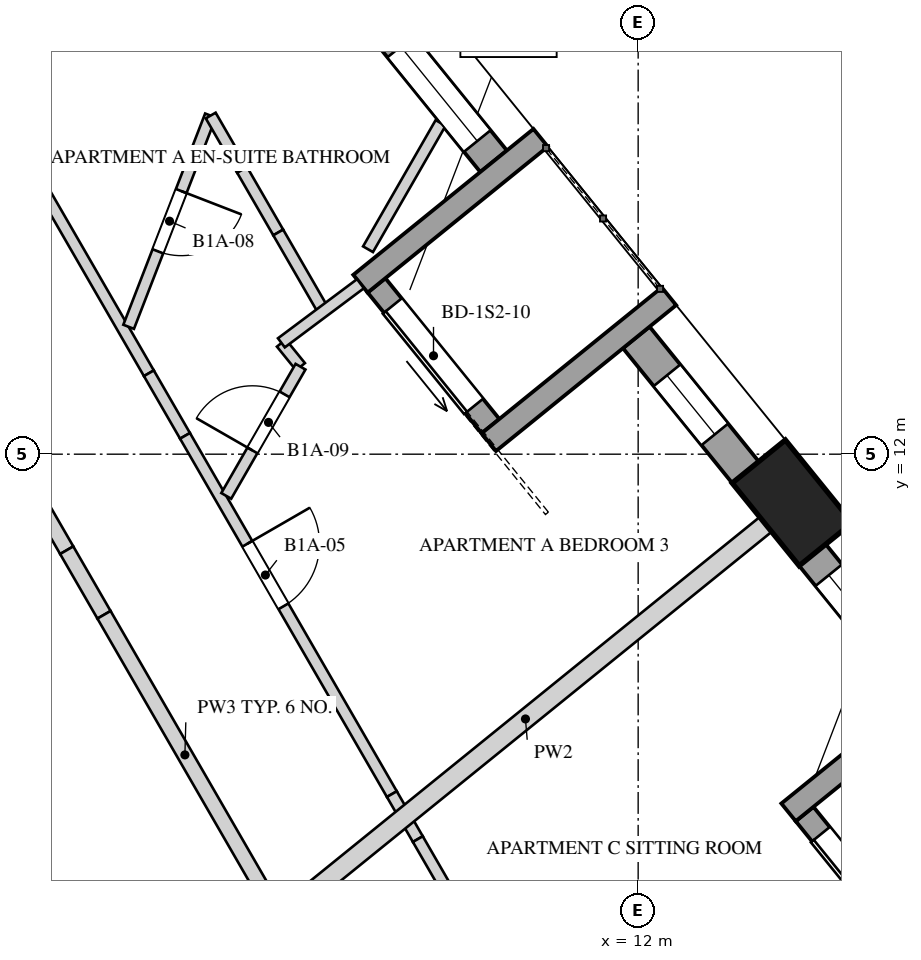
"""IFC4 building model, lengths in metres.
Left out: names, types, materials, properties, quantities, classifications, styles, units other than length and angle.
Written with IfcOpenShell. Run it as: python <this file> out.ifc"""

import sys

from ifc_helpers import new_model, si_unit, direction, frame, frame_2d, origin, origin_2d, place, context, subcontext, project, spatial, rectangle, extrude, element, fill, save


model = new_model("IFC4")
c1 = context("Model", 3, precision=1e-05, world=origin(), true_north=direction((0.0, 1.0)))
c2 = subcontext(c1, "Body", "Model", "MODEL_VIEW")
j1 = project(units=[si_unit("LENGTHUNIT", "METRE"), si_unit("PLANEANGLEUNIT", "RADIAN")], contexts=[c1])
p1 = place(None, origin())
s1 = spatial("IfcSite", under=j1, at=p1, CompositionType="ELEMENT")
p2 = place(p1, origin())
s2 = spatial("IfcBuilding", under=s1, at=p2, CompositionType="ELEMENT")
p3 = place(p2, frame((0.0, 0.0, 51.2)))
s3 = spatial("IfcBuildingStorey", under=s2, at=p3, CompositionType="ELEMENT", Elevation=51.2)
p4 = place(p3, frame((9.642, -4.25, 0.0), z_axis=(0.0, 0.0, 1.0), x_axis=(-0.499985955615, 0.866033512162, 0.0)))
e1 = element("IfcWall", 1, at=p4, inside=s3, PredefinedType="SHEAR", context=c2, shape_type="SweptSolid", body=[
    extrude(rectangle(XDim=17.003, YDim=1.05, at=frame_2d((8.501, 0.0))), origin(), (0.0, 0.0, 1.0), 4.0),
])
p5 = place(p4, frame((6.776, 0.0, 0.0)))
e2 = element("IfcOpeningElement", 2, at=p5, cuts=e1, PredefinedType="OPENING", context=c2, shape_type="SweptSolid", body=[
    extrude(rectangle(XDim=1.0, YDim=2.4, at=frame_2d((0.5, 1.2))), frame((0.0, 0.535, 0.0), z_axis=(0.0, -1.0, 0.0), x_axis=(1.0, 0.0, 0.0)), (0.0, 0.0, 1.0), 1.07),
])
p6 = place(p3, frame((14.028, 11.359, -0.35), z_axis=(0.0, 0.0, 1.0), x_axis=(-0.62932039105, 0.777145961457, 0.0)))
e3 = element("IfcColumn", 3, at=p6, inside=s3, PredefinedType="COLUMN", context=c2, shape_type="SweptSolid", body=[
    extrude(rectangle(XDim=1.4, YDim=0.9, at=origin_2d()), origin(), (0.0, 0.0, 1.0), 4.35),
])
p7 = place(p3, frame((15.73, 8.899, 0.0), z_axis=(0.0, 0.0, 1.0), x_axis=(-0.629339730135, 0.777130300576, 0.0)))
e4 = element("IfcWall", 4, at=p7, inside=s3, PredefinedType="SOLIDWALL", context=c2, shape_type="SweptSolid", body=[
    extrude(rectangle(XDim=2.283, YDim=0.45, at=frame_2d((1.142, 0.0))), origin(), (0.0, 0.0, 1.0), 3.3),
])
p8 = place(p7, frame((0.342, 0.0, 0.7)))
e5 = element("IfcOpeningElement", 5, at=p8, cuts=e4, PredefinedType="OPENING", context=c2, shape_type="SweptSolid", body=[
    extrude(rectangle(XDim=1.6, YDim=2.3, at=frame_2d((0.8, 1.15))), frame((0.0, 0.235, 0.0), z_axis=(0.0, -1.0, 0.0), x_axis=(1.0, 0.0, 0.0)), (0.0, 0.0, 1.0), 0.47),
])
p9 = place(p3, frame((13.412, 11.762, 0.0), z_axis=(0.0, 0.0, 1.0), x_axis=(-0.629339730135, 0.777130300576, 0.0)))
e6 = element("IfcWall", 6, at=p9, inside=s3, PredefinedType="SOLIDWALL", context=c2, shape_type="SweptSolid", body=[
    extrude(rectangle(XDim=2.283, YDim=0.45, at=frame_2d((1.142, 0.0))), origin(), (0.0, 0.0, 1.0), 3.3),
])
p10 = place(p9, frame((0.642, 0.0, 0.7)))
e7 = element("IfcOpeningElement", 7, at=p10, cuts=e6, PredefinedType="OPENING", context=c2, shape_type="SweptSolid", body=[
    extrude(rectangle(XDim=1.0, YDim=2.3, at=frame_2d((0.5, 1.15))), frame((0.0, 0.235, 0.0), z_axis=(0.0, -1.0, 0.0), x_axis=(1.0, 0.0, 0.0)), (0.0, 0.0, 1.0), 0.47),
])
p11 = place(p3, frame((10.098, 15.854, 0.0), z_axis=(0.0, 0.0, 1.0), x_axis=(-0.629339730135, 0.777130300576, 0.0)))
e8 = element("IfcWall", 8, at=p11, inside=s3, PredefinedType="SOLIDWALL", context=c2, shape_type="SweptSolid", body=[
    extrude(rectangle(XDim=2.283, YDim=0.45, at=frame_2d((1.142, 0.0))), origin(), (0.0, 0.0, 1.0), 3.3),
])
p12 = place(p11, frame((0.342, 0.0, 0.7)))
e9 = element("IfcOpeningElement", 9, at=p12, cuts=e8, PredefinedType="OPENING", context=c2, shape_type="SweptSolid", body=[
    extrude(rectangle(XDim=1.6, YDim=2.3, at=frame_2d((0.8, 1.15))), frame((0.0, 0.235, 0.0), z_axis=(0.0, -1.0, 0.0), x_axis=(1.0, 0.0, 0.0)), (0.0, 0.0, 1.0), 0.47),
])
p13 = place(p3, frame((15.689, 5.414, 0.0), z_axis=(0.0, 0.0, 1.0), x_axis=(-0.629319049918, 0.777147047482, 0.0)))
e10 = element("IfcWall", 10, at=p13, inside=s3, PredefinedType="SOLIDWALL", context=c2, shape_type="SweptSolid", body=[
    extrude(rectangle(XDim=2.383, YDim=0.3, at=frame_2d((1.191, 0.0))), origin(), (0.0, 0.0, 1.0), 3.3),
])
p14 = place(p13, frame((0.342, 0.0, 0.0)))
e11 = element("IfcOpeningElement", 11, at=p14, cuts=e10, PredefinedType="OPENING", context=c2, shape_type="SweptSolid", body=[
    extrude(rectangle(XDim=1.7, YDim=2.4, at=frame_2d((0.85, 1.2))), frame((0.0, 0.16, 0.0), z_axis=(0.0, -1.0, 0.0), x_axis=(1.0, 0.0, 0.0)), (0.0, 0.0, 1.0), 0.32),
])
p15 = place(p3, frame((16.349, 9.208, 0.0), z_axis=(0.0, 0.0, 1.0), x_axis=(-0.777153523895, -0.629311052102, 0.0)))
e12 = element("IfcWall", 12, at=p15, inside=s3, PredefinedType="SOLIDWALL", context=c2, shape_type="SweptSolid", body=[
    extrude(rectangle(XDim=3.05, YDim=0.3, at=frame_2d((1.525, 0.0))), origin(), (0.0, 0.0, 1.0), 3.3),
])
p16 = place(p3, frame((10.057, 12.369, 0.0), z_axis=(0.0, 0.0, 1.0), x_axis=(-0.629257171563, 0.777197151331, 0.0)))
e13 = element("IfcWall", 13, at=p16, inside=s3, PredefinedType="SOLIDWALL", context=c2, shape_type="SweptSolid", body=[
    extrude(rectangle(XDim=2.383, YDim=0.3, at=frame_2d((1.191, 0.0))), origin(), (0.0, 0.0, 1.0), 3.3),
])
p17 = place(p16, frame((0.342, 0.0, 0.0)))
e14 = element("IfcOpeningElement", 14, at=p17, cuts=e13, PredefinedType="OPENING", context=c2, shape_type="SweptSolid", body=[
    extrude(rectangle(XDim=1.7, YDim=2.4, at=frame_2d((0.85, 1.2))), frame((0.0, 0.16, 0.0), z_axis=(0.0, -1.0, 0.0), x_axis=(1.0, 0.0, 0.0)), (0.0, 0.0, 1.0), 0.32),
])
p18 = place(p3, frame((12.406, 14.077, 0.0), z_axis=(0.0, 0.0, 1.0), x_axis=(-0.777153523895, -0.629311052102, 0.0)))
e15 = element("IfcWall", 15, at=p18, inside=s3, PredefinedType="SOLIDWALL", context=c2, shape_type="SweptSolid", body=[
    extrude(rectangle(XDim=3.05, YDim=0.3, at=frame_2d((1.525, 0.0))), origin(), (0.0, 0.0, 1.0), 3.3),
])
p19 = place(p3, frame((10.717, 16.162, 0.0), z_axis=(0.0, 0.0, 1.0), x_axis=(-0.777121820661, -0.629350201281, 0.0)))
e16 = element("IfcWall", 16, at=p19, inside=s3, PredefinedType="SOLIDWALL", context=c2, shape_type="SweptSolid", body=[
    extrude(rectangle(XDim=3.05, YDim=0.3, at=frame_2d((1.525, 0.0))), origin(), (0.0, 0.0, 1.0), 3.3),
])
p20 = place(p3, frame((5.026, 2.244, 0.0), z_axis=(0.0, 0.0, 1.0), x_axis=(-0.500002801628, 0.866023786258, 0.0)))
e17 = element("IfcWall", 17, at=p20, inside=s3, PredefinedType="SOLIDWALL", context=c2, shape_type="SweptSolid", body=[
    extrude(rectangle(XDim=4.9, YDim=0.25, at=frame_2d((2.45, 0.0))), origin(), (0.0, 0.0, 1.0), 3.65),
])
p21 = place(p3, frame((4.099, 15.6, 0.0), z_axis=(0.0, 0.0, 1.0), x_axis=(0.500013600279, -0.866017551517, 0.0)))
e18 = element("IfcWall", 18, at=p21, inside=s3, PredefinedType="PARTITIONING", context=c2, shape_type="SweptSolid", body=[
    extrude(rectangle(XDim=2.928, YDim=0.15, at=frame_2d((1.464, 0.0))), origin(), (0.0, 0.0, 1.0), 3.65),
])
p22 = place(p3, frame((5.563, 13.065, 0.0), z_axis=(0.0, 0.0, 1.0), x_axis=(0.500033686847, -0.8660059538, 0.0)))
e19 = element("IfcWall", 19, at=p22, inside=s3, PredefinedType="PARTITIONING", context=c2, shape_type="SweptSolid", body=[
    extrude(rectangle(XDim=0.951, YDim=0.15, at=frame_2d((0.475, 0.0))), origin(), (0.0, 0.0, 1.0), 2.75),
])
p23 = place(p3, frame((6.038, 12.241, 0.0), z_axis=(0.0, 0.0, 1.0), x_axis=(0.500003308737, -0.866023493476, 0.0)))
e20 = element("IfcWall", 20, at=p23, inside=s3, PredefinedType="PARTITIONING", context=c2, shape_type="SweptSolid", body=[
    extrude(rectangle(XDim=5.443, YDim=0.15, at=frame_2d((2.721, 0.0))), origin(), (0.0, 0.0, 1.0), 3.65),
])
p24 = place(p23, frame((1.64, 0.0, 0.0)))
e21 = element("IfcOpeningElement", 21, at=p24, cuts=e20, PredefinedType="OPENING", context=c2, shape_type="SweptSolid", body=[
    extrude(rectangle(XDim=0.95, YDim=2.4, at=frame_2d((0.475, 1.2))), frame((0.0, 0.085, 0.0), z_axis=(0.0, -1.0, 0.0), x_axis=(1.0, 0.0, 0.0)), (0.0, 0.0, 1.0), 0.17),
])
p25 = place(p3, frame((8.76, 7.528, 0.0), z_axis=(0.0, 0.0, 1.0), x_axis=(0.499712146016, -0.866191532586, 0.0)))
e22 = element("IfcWall", 22, at=p25, inside=s3, PredefinedType="PARTITIONING", context=c2, shape_type="SweptSolid", body=[
    extrude(rectangle(XDim=0.684, YDim=0.15, at=frame_2d((0.342, 0.0))), origin(), (0.0, 0.0, 1.0), 2.95),
])
p26 = place(p3, frame((9.101, 6.936, 0.0), z_axis=(0.0, 0.0, 1.0), x_axis=(0.500008794324, -0.866020326319, 0.0)))
e23 = element("IfcWall", 23, at=p26, inside=s3, PredefinedType="PARTITIONING", context=c2, shape_type="SweptSolid", body=[
    extrude(rectangle(XDim=4.601, YDim=0.15, at=frame_2d((2.3, 0.0))), origin(), (0.0, 0.0, 1.0), 3.65),
])
p27 = place(p26, frame((1.922, 0.0, 0.0)))
e24 = element("IfcOpeningElement", 24, at=p27, cuts=e23, PredefinedType="OPENING", context=c2, shape_type="SweptSolid", body=[
    extrude(rectangle(XDim=0.95, YDim=2.4, at=frame_2d((0.475, 1.2))), frame((0.0, 0.085, 0.0), z_axis=(0.0, -1.0, 0.0), x_axis=(1.0, 0.0, 0.0)), (0.0, 0.0, 1.0), 0.17),
])
p28 = place(p3, frame((6.373, 16.455, 0.0), z_axis=(0.0, 0.0, 1.0), x_axis=(-0.361113609809, -0.932521828597, 0.0)))
e25 = element("IfcWall", 25, at=p28, inside=s3, PredefinedType="PARTITIONING", context=c2, shape_type="SweptSolid", body=[
    extrude(rectangle(XDim=2.98, YDim=0.15, at=frame_2d((1.49, 0.0))), origin(), (0.0, 0.0, 1.0), 3.65),
])
p29 = place(p28, frame((1.065, 0.0, 0.0)))
e26 = element("IfcOpeningElement", 26, at=p29, cuts=e25, PredefinedType="OPENING", context=c2, shape_type="SweptSolid", body=[
    extrude(rectangle(XDim=0.85, YDim=2.4, at=frame_2d((0.425, 1.2))), frame((0.0, 0.085, 0.0), z_axis=(0.0, -1.0, 0.0), x_axis=(1.0, 0.0, 0.0)), (0.0, 0.0, 1.0), 0.17),
])
p30 = place(p3, frame((6.376, 16.455, 0.0), z_axis=(0.0, 0.0, 1.0), x_axis=(0.500080620599, -0.865978852456, 0.0)))
e27 = element("IfcWall", 27, at=p30, inside=s3, PredefinedType="PARTITIONING", context=c2, shape_type="SweptSolid", body=[
    extrude(rectangle(XDim=0.826, YDim=0.15, at=frame_2d((0.413, 0.0))), origin(), (0.0, 0.0, 1.0), 3.65),
])
p31 = place(p3, frame((6.79, 15.74, 0.0), z_axis=(0.0, 0.0, 1.0), x_axis=(0.500144919923, -0.865941718059, 0.0)))
e28 = element("IfcWall", 28, at=p31, inside=s3, PredefinedType="PARTITIONING", context=c2, shape_type="SweptSolid", body=[
    extrude(rectangle(XDim=0.95, YDim=0.15, at=frame_2d((0.475, 0.0))), origin(), (0.0, 0.0, 1.0), 2.75),
])
p32 = place(p3, frame((7.265, 14.917, 0.0), z_axis=(0.0, 0.0, 1.0), x_axis=(0.49995746443, -0.866049960314, 0.0)))
e29 = element("IfcWall", 29, at=p32, inside=s3, PredefinedType="PARTITIONING", context=c2, shape_type="SweptSolid", body=[
    extrude(rectangle(XDim=1.169, YDim=0.15, at=frame_2d((0.584, 0.0))), origin(), (0.0, 0.0, 1.0), 3.65),
])
p33 = place(p3, frame((7.306, 13.462, 0.0), z_axis=(0.0, 0.0, 1.0), x_axis=(0.629373821477, -0.777102691309, 0.0)))
e30 = element("IfcWall", 30, at=p33, inside=s3, PredefinedType="PARTITIONING", context=c2, shape_type="SweptSolid", body=[
    extrude(rectangle(XDim=0.4, YDim=0.15, at=frame_2d((0.2, 0.0))), origin(), (0.0, 0.0, 1.0), 3.65),
])
p34 = place(p3, frame((6.581, 11.451, 0.0), z_axis=(0.0, 0.0, 1.0), x_axis=(0.498323693161, 0.866991059259, 0.0)))
e31 = element("IfcWall", 31, at=p34, inside=s3, PredefinedType="PARTITIONING", context=c2, shape_type="SweptSolid", body=[
    extrude(rectangle(XDim=1.96, YDim=0.15, at=frame_2d((0.98, 0.0))), origin(), (0.0, 0.0, 1.0), 3.65),
])
p35 = place(p34, frame((0.69, 0.0, 0.0)))
e32 = element("IfcOpeningElement", 32, at=p35, cuts=e31, PredefinedType="OPENING", context=c2, shape_type="SweptSolid", body=[
    extrude(rectangle(XDim=0.85, YDim=2.4, at=frame_2d((0.425, 1.2))), frame((0.0, 0.085, 0.0), z_axis=(0.0, -1.0, 0.0), x_axis=(1.0, 0.0, 0.0)), (0.0, 0.0, 1.0), 0.17),
])
p36 = place(p3, frame((8.347, 14.243, 0.0), z_axis=(0.0, 0.0, 1.0), x_axis=(-0.800856036298, -0.598856918742, 0.0)))
e33 = element("IfcWall", 33, at=p36, inside=s3, PredefinedType="PARTITIONING", context=c2, shape_type="SweptSolid", body=[
    extrude(rectangle(XDim=1.299, YDim=0.15, at=frame_2d((0.65, 0.0))), origin(), (0.0, 0.0, 1.0), 3.65),
])
p37 = place(p3, frame((9.401, 16.358, 0.0), z_axis=(0.0, 0.0, 1.0), x_axis=(-0.498291581793, -0.867009515239, 0.0)))
e34 = element("IfcWall", 34, at=p37, inside=s3, PredefinedType="PARTITIONING", context=c2, shape_type="SweptSolid", body=[
    extrude(rectangle(XDim=1.916, YDim=0.15, at=frame_2d((0.958, 0.0))), origin(), (0.0, 0.0, 1.0), 3.65),
])
p38 = place(p3, frame((13.678, 11.076, 0.0), z_axis=(0.0, 0.0, 1.0), x_axis=(-0.777150492193, -0.629314796015, 0.0)))
e35 = element("IfcWall", 35, at=p38, inside=s3, PredefinedType="SOLIDWALL", context=c2, shape_type="SweptSolid", body=[
    extrude(rectangle(XDim=8.133, YDim=0.25, at=frame_2d((4.067, 0.0))), origin(), (0.0, 0.0, 1.0), 2.95),
])
p39 = place(p3, frame((2.887, 13.5, 0.0), z_axis=(0.0, 0.0, 1.0), x_axis=(0.50003154259, -0.866007191896, 0.0)))
e36 = element("IfcWall", 36, at=p39, inside=s3, PredefinedType="SOLIDWALL", context=c2, shape_type="SweptSolid", body=[
    extrude(rectangle(XDim=3.191, YDim=0.2, at=frame_2d((1.595, 0.0))), origin(), (0.0, 0.0, 1.0), 3.65),
])
p40 = place(p3, frame((4.482, 10.737, 0.0), z_axis=(0.0, 0.0, 1.0), x_axis=(0.499966601515, -0.86604468555, 0.0)))
e37 = element("IfcWall", 37, at=p40, inside=s3, PredefinedType="SOLIDWALL", context=c2, shape_type="SweptSolid", body=[
    extrude(rectangle(XDim=0.981, YDim=0.2, at=frame_2d((0.49, 0.0))), origin(), (0.0, 0.0, 1.0), 2.75),
])
p41 = place(p3, frame((4.973, 9.887, 0.0), z_axis=(0.0, 0.0, 1.0), x_axis=(0.500000470374, -0.866025132214, 0.0)))
e38 = element("IfcWall", 38, at=p41, inside=s3, PredefinedType="SOLIDWALL", context=c2, shape_type="SweptSolid", body=[
    extrude(rectangle(XDim=4.257, YDim=0.2, at=frame_2d((2.128, 0.0))), origin(), (0.0, 0.0, 1.0), 3.65),
])
p42 = place(p8, origin())
e39 = element("IfcWindow", 39, at=p42, inside=s3, PartitioningType="SINGLE_PANEL", PredefinedType="WINDOW", context=c2, shape_type="SweptSolid", body=[
    extrude(rectangle(XDim=1.6, YDim=2.3, at=frame_2d((0.8, 1.15))), frame((0.0, 0.03, 0.0), z_axis=(0.0, -1.0, 0.0), x_axis=(1.0, 0.0, 0.0)), (0.0, 0.0, 1.0), 0.06),
])
fill(e5, e39)
p43 = place(p10, origin())
e40 = element("IfcWindow", 40, at=p43, inside=s3, PartitioningType="SINGLE_PANEL", PredefinedType="WINDOW", context=c2, shape_type="SweptSolid", body=[
    extrude(rectangle(XDim=1.0, YDim=2.3, at=frame_2d((0.5, 1.15))), frame((0.0, 0.03, 0.0), z_axis=(0.0, -1.0, 0.0), x_axis=(1.0, 0.0, 0.0)), (0.0, 0.0, 1.0), 0.06),
])
fill(e7, e40)
p44 = place(p12, origin())
e41 = element("IfcWindow", 41, at=p44, inside=s3, PartitioningType="SINGLE_PANEL", PredefinedType="WINDOW", context=c2, shape_type="SweptSolid", body=[
    extrude(rectangle(XDim=1.6, YDim=2.3, at=frame_2d((0.8, 1.15))), frame((0.0, 0.03, 0.0), z_axis=(0.0, -1.0, 0.0), x_axis=(1.0, 0.0, 0.0)), (0.0, 0.0, 1.0), 0.06),
])
fill(e9, e41)
p45 = place(p14, origin())
e42 = element("IfcDoor", 42, at=p45, inside=s3, OperationType="SLIDING_TO_LEFT", PredefinedType="DOOR", context=c2, shape_type="SweptSolid", body=[
    extrude(rectangle(XDim=1.7, YDim=2.4, at=frame_2d((0.85, 1.2))), frame((0.0, 0.025, 0.0), z_axis=(0.0, -1.0, 0.0), x_axis=(1.0, 0.0, 0.0)), (0.0, 0.0, 1.0), 0.05),
])
fill(e11, e42)
p46 = place(p17, origin())
e43 = element("IfcDoor", 43, at=p46, inside=s3, OperationType="SLIDING_TO_LEFT", PredefinedType="DOOR", context=c2, shape_type="SweptSolid", body=[
    extrude(rectangle(XDim=1.7, YDim=2.4, at=frame_2d((0.85, 1.2))), frame((0.0, 0.025, 0.0), z_axis=(0.0, -1.0, 0.0), x_axis=(1.0, 0.0, 0.0)), (0.0, 0.0, 1.0), 0.05),
])
fill(e14, e43)
p47 = place(p24, origin())
e44 = element("IfcDoor", 44, at=p47, inside=s3, OperationType="SINGLE_SWING_LEFT", PredefinedType="DOOR", context=c2, shape_type="SweptSolid", body=[
    extrude(rectangle(XDim=0.95, YDim=2.4, at=frame_2d((0.475, 1.2))), frame((0.0, 0.025, 0.0), z_axis=(0.0, -1.0, 0.0), x_axis=(1.0, 0.0, 0.0)), (0.0, 0.0, 1.0), 0.05),
])
fill(e21, e44)
p48 = place(p29, origin())
e45 = element("IfcDoor", 45, at=p48, inside=s3, OperationType="SINGLE_SWING_RIGHT", PredefinedType="DOOR", context=c2, shape_type="SweptSolid", body=[
    extrude(rectangle(XDim=0.85, YDim=2.4, at=frame_2d((0.425, 1.2))), frame((0.0, 0.025, 0.0), z_axis=(0.0, -1.0, 0.0), x_axis=(1.0, 0.0, 0.0)), (0.0, 0.0, 1.0), 0.05),
])
fill(e26, e45)
p49 = place(p35, origin())
e46 = element("IfcDoor", 46, at=p49, inside=s3, OperationType="SINGLE_SWING_LEFT", PredefinedType="DOOR", context=c2, shape_type="SweptSolid", body=[
    extrude(rectangle(XDim=0.85, YDim=2.4, at=frame_2d((0.425, 1.2))), frame((0.0, 0.025, 0.0), z_axis=(0.0, -1.0, 0.0), x_axis=(1.0, 0.0, 0.0)), (0.0, 0.0, 1.0), 0.05),
])
fill(e32, e46)
save(model, sys.argv[1])
